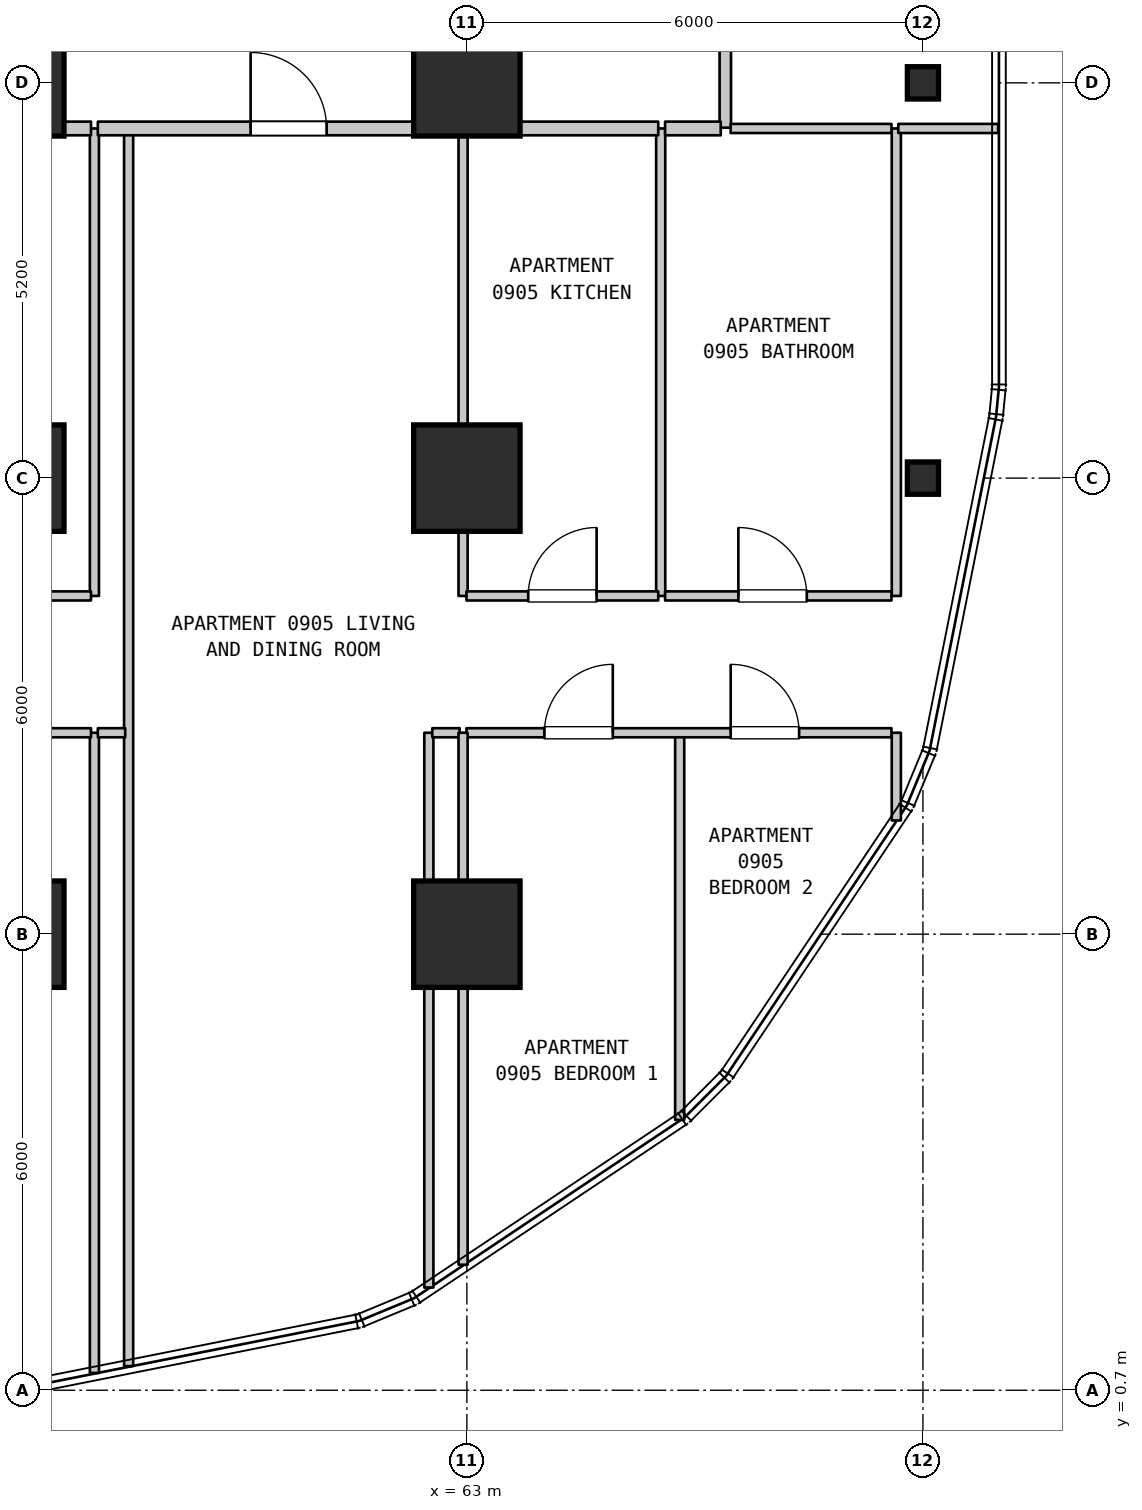
"""IFC4 building model, lengths in metres.
Left out: names, types, materials, properties, quantities, classifications, styles, units other than length and angle.
Written with IfcOpenShell. Run it as: python <this file> out.ifc"""

import sys

from ifc_helpers import new_model, si_unit, direction, frame, frame_2d, origin, origin_2d, place, context, subcontext, project, spatial, rectangle, i_section, extrude, element, fill, save


model = new_model("IFC4")
c1 = context("Model", 3, precision=1e-05, world=origin(), true_north=direction((0.0, 1.0)))
c2 = subcontext(c1, "Body", "Model", "MODEL_VIEW")
j1 = project(units=[si_unit("LENGTHUNIT", "METRE"), si_unit("PLANEANGLEUNIT", "RADIAN")], contexts=[c1])
p1 = place(None, origin())
s1 = spatial("IfcSite", under=j1, at=p1, CompositionType="ELEMENT")
p2 = place(p1, origin())
s2 = spatial("IfcBuilding", under=s1, at=p2, CompositionType="ELEMENT")
p3 = place(p2, frame((0.0, 0.0, 42.5)))
s3 = spatial("IfcBuildingStorey", under=s2, at=p3, CompositionType="ELEMENT", Elevation=42.5)
for number, where, z_axis, x_axis in (
    (1, (57.0, 6.7, 0.0), (0.0, 0.0, 1.0), (1.0, 0.0, 0.0)),
    (2, (57.0, 12.7, 0.0), (0.0, 0.0, 1.0), (1.0, 0.0, 0.0)),
    (3, (57.0, 17.9, 0.0), (0.0, 0.0, 1.0), (1.0, 0.0, 0.0)),
    (4, (63.0, 6.7, 0.0), (0.0, 0.0, 1.0), (1.0, 0.0, 0.0)),
    (5, (63.0, 12.7, 0.0), (0.0, 0.0, 1.0), (1.0, 0.0, 0.0)),
    (6, (63.0, 17.9, 0.0), (0.0, 0.0, 1.0), (1.0, 0.0, 0.0)),
):
    element("IfcColumn", number, at=place(p3, frame(where, z_axis=z_axis, x_axis=x_axis)), inside=s3, PredefinedType="COLUMN", context=c2, shape_type="SweptSolid", body=[
        extrude(rectangle(XDim=1.4, YDim=1.4, at=origin_2d()), origin(), (0.0, 0.0, 1.0), 3.7),
    ])
for number, where, z_axis, x_axis in (
    (7, (69.0, 12.7, 0.0), (0.0, 0.0, 1.0), (1.0, 0.0, 0.0)),
    (8, (69.0, 17.9, 0.0), (0.0, 0.0, 1.0), (1.0, 0.0, 0.0)),
):
    element("IfcColumn", number, at=place(p3, frame(where, z_axis=z_axis, x_axis=x_axis)), inside=s3, PredefinedType="COLUMN", context=c2, shape_type="SweptSolid", body=[
        extrude(i_section(OverallWidth=0.409, OverallDepth=0.425, WebThickness=0.032, FlangeThickness=0.052, FilletRadius=0.015, at=origin_2d()), origin(), (0.0, 0.0, 1.0), 3.7),
    ])
p4 = place(p3, frame((58.1, 0.928, 0.0), z_axis=(0.0, 0.0, 1.0), x_axis=(0.0, 1.0, 0.0)))
e9 = element("IfcWall", 9, at=p4, inside=s3, PredefinedType="PARTITIONING", context=c2, shape_type="SweptSolid", body=[
    extrude(rectangle(XDim=8.422, YDim=0.12, at=frame_2d((4.211, 0.0))), origin(), (0.0, 0.0, 1.0), 3.385),
])
p5 = place(p3, frame((58.1, 11.15, 0.0), z_axis=(0.0, 0.0, 1.0), x_axis=(0.0, 1.0, 0.0)))
e10 = element("IfcWall", 10, at=p5, inside=s3, PredefinedType="PARTITIONING", context=c2, shape_type="SweptSolid", body=[
    extrude(rectangle(XDim=6.15, YDim=0.12, at=frame_2d((3.075, 0.0))), origin(), (0.0, 0.0, 1.0), 3.385),
])
p6 = place(p3, frame((58.55, 1.018, 0.0), z_axis=(0.0, 0.0, 1.0), x_axis=(0.0, 1.0, 0.0)))
e11 = element("IfcWall", 11, at=p6, inside=s3, PredefinedType="PARTITIONING", context=c2, shape_type="SweptSolid", body=[
    extrude(rectangle(XDim=16.282, YDim=0.12, at=frame_2d((8.141, 0.0))), origin(), (0.0, 0.0, 1.0), 3.385),
])
p7 = place(p3, frame((62.5, 2.051, 0.0), z_axis=(0.0, 0.0, 1.0), x_axis=(0.0, 1.0, 0.0)))
e12 = element("IfcWall", 12, at=p7, inside=s3, PredefinedType="PARTITIONING", context=c2, shape_type="SweptSolid", body=[
    extrude(rectangle(XDim=7.299, YDim=0.12, at=frame_2d((3.649, 0.0))), origin(), (0.0, 0.0, 1.0), 3.385),
])
p8 = place(p3, frame((62.95, 2.351, 0.0), z_axis=(0.0, 0.0, 1.0), x_axis=(0.0, 1.0, 0.0)))
e13 = element("IfcWall", 13, at=p8, inside=s3, PredefinedType="PARTITIONING", context=c2, shape_type="SweptSolid", body=[
    extrude(rectangle(XDim=4.349, YDim=0.12, at=frame_2d((2.174, 0.0))), origin(), (0.0, 0.0, 1.0), 3.385),
])
p9 = place(p3, frame((62.95, 11.15, 0.0), z_axis=(0.0, 0.0, 1.0), x_axis=(0.0, 1.0, 0.0)))
e14 = element("IfcWall", 14, at=p9, inside=s3, PredefinedType="PARTITIONING", context=c2, shape_type="SweptSolid", body=[
    extrude(rectangle(XDim=6.15, YDim=0.12, at=frame_2d((3.075, 0.0))), origin(), (0.0, 0.0, 1.0), 2.885),
])
p10 = place(p3, frame((65.55, 11.15, 0.0), z_axis=(0.0, 0.0, 1.0), x_axis=(0.0, 1.0, 0.0)))
e15 = element("IfcWall", 15, at=p10, inside=s3, PredefinedType="PARTITIONING", context=c2, shape_type="SweptSolid", body=[
    extrude(rectangle(XDim=6.15, YDim=0.12, at=frame_2d((3.075, 0.0))), origin(), (0.0, 0.0, 1.0), 3.385),
])
p11 = place(p3, frame((65.8, 4.256, 0.0), z_axis=(0.0, 0.0, 1.0), x_axis=(0.0, 1.0, 0.0)))
e16 = element("IfcWall", 16, at=p11, inside=s3, PredefinedType="PARTITIONING", context=c2, shape_type="SweptSolid", body=[
    extrude(rectangle(XDim=5.094, YDim=0.12, at=frame_2d((2.547, 0.0))), origin(), (0.0, 0.0, 1.0), 3.385),
])
p12 = place(p3, frame((66.4, 17.31, 0.0), z_axis=(0.0, 0.0, 1.0), x_axis=(0.0, 1.0, 0.0)))
e17 = element("IfcWall", 17, at=p12, inside=s3, PredefinedType="STANDARD", context=c2, shape_type="SweptSolid", body=[
    extrude(rectangle(XDim=2.34, YDim=0.15, at=frame_2d((1.17, 0.0))), origin(), (0.0, 0.0, 1.0), 3.385),
])
p13 = place(p3, frame((68.65, 8.196, 0.0), z_axis=(0.0, 0.0, 1.0), x_axis=(0.0, 1.0, 0.0)))
e18 = element("IfcWall", 18, at=p13, inside=s3, PredefinedType="PARTITIONING", context=c2, shape_type="SweptSolid", body=[
    extrude(rectangle(XDim=1.154, YDim=0.12, at=frame_2d((0.577, 0.0))), origin(), (0.0, 0.0, 1.0), 3.385),
])
p14 = place(p3, frame((68.65, 11.15, 0.0), z_axis=(0.0, 0.0, 1.0), x_axis=(0.0, 1.0, 0.0)))
e19 = element("IfcWall", 19, at=p14, inside=s3, PredefinedType="PARTITIONING", context=c2, shape_type="SweptSolid", body=[
    extrude(rectangle(XDim=6.15, YDim=0.12, at=frame_2d((3.075, 0.0))), origin(), (0.0, 0.0, 1.0), 3.385),
])
p15 = place(p3, frame((51.635, 9.35, 0.0), z_axis=(0.0, 0.0, 1.0), x_axis=(1.0, 0.0, 0.0)))
e20 = element("IfcWall", 20, at=p15, inside=s3, PredefinedType="PARTITIONING", context=c2, shape_type="SweptSolid", body=[
    extrude(rectangle(XDim=6.42, YDim=0.12, at=frame_2d((3.21, 0.0))), origin(), (0.0, 0.0, 1.0), 3.385),
])
p16 = place(p15, frame((1.307, 0.0, 0.0)))
e21 = element("IfcOpeningElement", 21, at=p16, cuts=e20, PredefinedType="OPENING", context=c2, shape_type="SweptSolid", body=[
    extrude(rectangle(XDim=0.9, YDim=2.15, at=frame_2d((0.45, 1.075))), frame((0.0, 0.07, 0.0), z_axis=(0.0, -1.0, 0.0), x_axis=(1.0, 0.0, 0.0)), (0.0, 0.0, 1.0), 0.14),
])
p17 = place(p15, frame((4.212, 0.0, 0.0)))
e22 = element("IfcOpeningElement", 22, at=p17, cuts=e20, PredefinedType="OPENING", context=c2, shape_type="SweptSolid", body=[
    extrude(rectangle(XDim=0.9, YDim=2.15, at=frame_2d((0.45, 1.075))), frame((0.0, 0.07, 0.0), z_axis=(0.0, -1.0, 0.0), x_axis=(1.0, 0.0, 0.0)), (0.0, 0.0, 1.0), 0.14),
])
p18 = place(p3, frame((58.145, 9.35, 0.0), z_axis=(0.0, 0.0, 1.0), x_axis=(1.0, 0.0, 0.0)))
e23 = element("IfcWall", 23, at=p18, inside=s3, PredefinedType="PARTITIONING", context=c2, shape_type="SweptSolid", body=[
    extrude(rectangle(XDim=0.36, YDim=0.12, at=frame_2d((0.18, 0.0))), origin(), (0.0, 0.0, 1.0), 3.385),
])
p19 = place(p3, frame((62.545, 9.35, 0.0), z_axis=(0.0, 0.0, 1.0), x_axis=(1.0, 0.0, 0.0)))
e24 = element("IfcWall", 24, at=p19, inside=s3, PredefinedType="PARTITIONING", context=c2, shape_type="SweptSolid", body=[
    extrude(rectangle(XDim=0.36, YDim=0.12, at=frame_2d((0.18, 0.0))), origin(), (0.0, 0.0, 1.0), 3.385),
])
p20 = place(p3, frame((62.995, 9.35, 0.0), z_axis=(0.0, 0.0, 1.0), x_axis=(1.0, 0.0, 0.0)))
e25 = element("IfcWall", 25, at=p20, inside=s3, PredefinedType="PARTITIONING", context=c2, shape_type="SweptSolid", body=[
    extrude(rectangle(XDim=5.591, YDim=0.12, at=frame_2d((2.795, 0.0))), origin(), (0.0, 0.0, 1.0), 3.385),
])
p21 = place(p20, frame((1.025, 0.0, 0.0)))
e26 = element("IfcOpeningElement", 26, at=p21, cuts=e25, PredefinedType="OPENING", context=c2, shape_type="SweptSolid", body=[
    extrude(rectangle(XDim=0.9, YDim=2.15, at=frame_2d((0.45, 1.075))), frame((0.0, 0.07, 0.0), z_axis=(0.0, -1.0, 0.0), x_axis=(1.0, 0.0, 0.0)), (0.0, 0.0, 1.0), 0.14),
])
p22 = place(p20, frame((3.476, 0.0, 0.0)))
e27 = element("IfcOpeningElement", 27, at=p22, cuts=e25, PredefinedType="OPENING", context=c2, shape_type="SweptSolid", body=[
    extrude(rectangle(XDim=0.9, YDim=2.15, at=frame_2d((0.45, 1.075))), frame((0.0, 0.07, 0.0), z_axis=(0.0, -1.0, 0.0), x_axis=(1.0, 0.0, 0.0)), (0.0, 0.0, 1.0), 0.14),
])
p23 = place(p3, frame((54.63, 11.15, 0.0), z_axis=(0.0, 0.0, 1.0), x_axis=(1.0, 0.0, 0.0)))
e28 = element("IfcWall", 28, at=p23, inside=s3, PredefinedType="PARTITIONING", context=c2, shape_type="SweptSolid", body=[
    extrude(rectangle(XDim=3.425, YDim=0.12, at=frame_2d((1.712, 0.0))), origin(), (0.0, 0.0, 1.0), 3.385),
])
p24 = place(p23, frame((0.769, 0.0, 0.0)))
e29 = element("IfcOpeningElement", 29, at=p24, cuts=e28, PredefinedType="OPENING", context=c2, shape_type="SweptSolid", body=[
    extrude(rectangle(XDim=0.9, YDim=2.1, at=frame_2d((0.45, 1.05))), frame((0.0, 0.07, 0.0), z_axis=(0.0, -1.0, 0.0), x_axis=(1.0, 0.0, 0.0)), (0.0, 0.0, 1.0), 0.14),
])
p25 = place(p3, frame((62.995, 11.15, 0.0), z_axis=(0.0, 0.0, 1.0), x_axis=(1.0, 0.0, 0.0)))
e30 = element("IfcWall", 30, at=p25, inside=s3, PredefinedType="PARTITIONING", context=c2, shape_type="SweptSolid", body=[
    extrude(rectangle(XDim=2.523, YDim=0.12, at=frame_2d((1.261, 0.0))), origin(), (0.0, 0.0, 1.0), 3.385),
])
p26 = place(p25, frame((0.812, 0.0, 0.0)))
e31 = element("IfcOpeningElement", 31, at=p26, cuts=e30, PredefinedType="OPENING", context=c2, shape_type="SweptSolid", body=[
    extrude(rectangle(XDim=0.9, YDim=2.15, at=frame_2d((0.45, 1.075))), frame((0.0, 0.07, 0.0), z_axis=(0.0, -1.0, 0.0), x_axis=(1.0, 0.0, 0.0)), (0.0, 0.0, 1.0), 0.14),
])
p27 = place(p3, frame((65.608, 11.15, 0.0), z_axis=(0.0, 0.0, 1.0), x_axis=(1.0, 0.0, 0.0)))
e32 = element("IfcWall", 32, at=p27, inside=s3, PredefinedType="PARTITIONING", context=c2, shape_type="SweptSolid", body=[
    extrude(rectangle(XDim=2.978, YDim=0.12, at=frame_2d((1.489, 0.0))), origin(), (0.0, 0.0, 1.0), 3.385),
])
p28 = place(p27, frame((0.964, 0.0, 0.0)))
e33 = element("IfcOpeningElement", 33, at=p28, cuts=e32, PredefinedType="OPENING", context=c2, shape_type="SweptSolid", body=[
    extrude(rectangle(XDim=0.9, YDim=2.1, at=frame_2d((0.45, 1.05))), frame((0.0, 0.07, 0.0), z_axis=(0.0, -1.0, 0.0), x_axis=(1.0, 0.0, 0.0)), (0.0, 0.0, 1.0), 0.14),
])
p29 = place(p3, frame((54.63, 17.3, 0.0), z_axis=(0.0, 0.0, 1.0), x_axis=(1.0, 0.0, 0.0)))
e34 = element("IfcWall", 34, at=p29, inside=s3, PredefinedType="STANDARD", context=c2, shape_type="SweptSolid", body=[
    extrude(rectangle(XDim=3.425, YDim=0.18, at=frame_2d((1.712, 0.0))), origin(), (0.0, 0.0, 1.0), 3.385),
])
p30 = place(p3, frame((58.145, 17.3, 0.0), z_axis=(0.0, 0.0, 1.0), x_axis=(1.0, 0.0, 0.0)))
e35 = element("IfcWall", 35, at=p30, inside=s3, PredefinedType="STANDARD", context=c2, shape_type="SweptSolid", body=[
    extrude(rectangle(XDim=4.76, YDim=0.18, at=frame_2d((2.38, 0.0))), origin(), (0.0, 0.0, 1.0), 3.385),
])
p31 = place(p30, frame((2.01, 0.0, 0.0)))
e36 = element("IfcOpeningElement", 36, at=p31, cuts=e35, PredefinedType="OPENING", context=c2, shape_type="SweptSolid", body=[
    extrude(rectangle(XDim=1.0, YDim=2.15, at=frame_2d((0.5, 1.075))), frame((0.0, 0.1, 0.0), z_axis=(0.0, -1.0, 0.0), x_axis=(1.0, 0.0, 0.0)), (0.0, 0.0, 1.0), 0.2),
])
p32 = place(p3, frame((62.995, 17.3, 0.0), z_axis=(0.0, 0.0, 1.0), x_axis=(1.0, 0.0, 0.0)))
e37 = element("IfcWall", 37, at=p32, inside=s3, PredefinedType="STANDARD", context=c2, shape_type="SweptSolid", body=[
    extrude(rectangle(XDim=2.523, YDim=0.18, at=frame_2d((1.261, 0.0))), origin(), (0.0, 0.0, 1.0), 3.385),
])
p33 = place(p3, frame((65.608, 17.3, 0.0), z_axis=(0.0, 0.0, 1.0), x_axis=(1.0, 0.0, 0.0)))
e38 = element("IfcWall", 38, at=p33, inside=s3, PredefinedType="STANDARD", context=c2, shape_type="SweptSolid", body=[
    extrude(rectangle(XDim=0.732, YDim=0.18, at=frame_2d((0.366, 0.0))), origin(), (0.0, 0.0, 1.0), 3.385),
])
p34 = place(p3, frame((66.47, 17.3, 0.0), z_axis=(0.0, 0.0, 1.0), x_axis=(1.0, 0.0, 0.0)))
e39 = element("IfcWall", 39, at=p34, inside=s3, PredefinedType="PARTITIONING", context=c2, shape_type="SweptSolid", body=[
    extrude(rectangle(XDim=2.116, YDim=0.12, at=frame_2d((1.058, 0.0))), origin(), (0.0, 0.0, 1.0), 3.385),
])
p35 = place(p3, frame((68.676, 17.3, 0.0), z_axis=(0.0, 0.0, 1.0), x_axis=(1.0, 0.0, 0.0)))
e40 = element("IfcWall", 40, at=p35, inside=s3, PredefinedType="PARTITIONING", context=c2, shape_type="SweptSolid", body=[
    extrude(rectangle(XDim=1.314, YDim=0.12, at=frame_2d((0.657, 0.0))), origin(), (0.0, 0.0, 1.0), 3.385),
])
p36 = place(p3, frame((62.95, 6.7, 0.0), z_axis=(0.0, 0.0, 1.0), x_axis=(0.0, 1.0, 0.0)))
e41 = element("IfcWall", 41, at=p36, inside=s3, PredefinedType="PARTITIONING", context=c2, shape_type="SweptSolid", body=[
    extrude(rectangle(XDim=2.65, YDim=0.12, at=frame_2d((1.325, 0.0))), origin(), (0.0, 0.0, 1.0), 2.885),
])
p37 = place(p21, origin())
e42 = element("IfcDoor", 42, at=p37, inside=s3, OperationType="SINGLE_SWING_RIGHT", PredefinedType="DOOR", context=c2, shape_type="SweptSolid", body=[
    extrude(rectangle(XDim=0.9, YDim=2.15, at=frame_2d((0.45, 1.075))), frame((0.0, 0.025, 0.0), z_axis=(0.0, -1.0, 0.0), x_axis=(1.0, 0.0, 0.0)), (0.0, 0.0, 1.0), 0.05),
])
fill(e26, e42)
p38 = place(p22, origin())
e43 = element("IfcDoor", 43, at=p38, inside=s3, OperationType="SINGLE_SWING_LEFT", PredefinedType="DOOR", context=c2, shape_type="SweptSolid", body=[
    extrude(rectangle(XDim=0.9, YDim=2.15, at=frame_2d((0.45, 1.075))), frame((0.0, 0.025, 0.0), z_axis=(0.0, -1.0, 0.0), x_axis=(1.0, 0.0, 0.0)), (0.0, 0.0, 1.0), 0.05),
])
fill(e27, e43)
p39 = place(p26, origin())
e44 = element("IfcDoor", 44, at=p39, inside=s3, OperationType="SINGLE_SWING_RIGHT", PredefinedType="DOOR", context=c2, shape_type="SweptSolid", body=[
    extrude(rectangle(XDim=0.9, YDim=2.15, at=frame_2d((0.45, 1.075))), frame((0.0, 0.025, 0.0), z_axis=(0.0, -1.0, 0.0), x_axis=(1.0, 0.0, 0.0)), (0.0, 0.0, 1.0), 0.05),
])
fill(e31, e44)
p40 = place(p28, origin())
e45 = element("IfcDoor", 45, at=p40, inside=s3, OperationType="SINGLE_SWING_LEFT", PredefinedType="DOOR", context=c2, shape_type="SweptSolid", body=[
    extrude(rectangle(XDim=0.9, YDim=2.1, at=frame_2d((0.45, 1.05))), frame((0.0, 0.025, 0.0), z_axis=(0.0, -1.0, 0.0), x_axis=(1.0, 0.0, 0.0)), (0.0, 0.0, 1.0), 0.05),
])
fill(e33, e45)
p41 = place(p31, origin())
e46 = element("IfcDoor", 46, at=p41, inside=s3, OperationType="SINGLE_SWING_LEFT", PredefinedType="DOOR", context=c2, shape_type="SweptSolid", body=[
    extrude(rectangle(XDim=1.0, YDim=2.15, at=frame_2d((0.5, 1.075))), frame((0.0, 0.025, 0.0), z_axis=(0.0, -1.0, 0.0), x_axis=(1.0, 0.0, 0.0)), (0.0, 0.0, 1.0), 0.05),
])
fill(e36, e46)
save(model, sys.argv[1])
